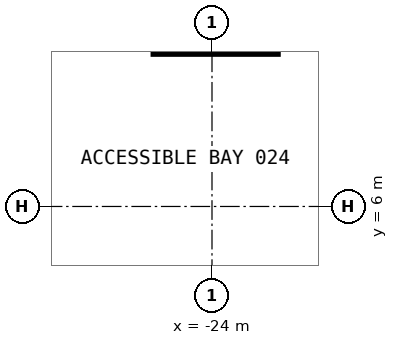
"""IFC4 building model, lengths in metres.
Left out: names, types, materials, properties, quantities, classifications, styles, units other than length and angle.
Written with IfcOpenShell. Run it as: python <this file> out.ifc"""

import sys

from ifc_helpers import new_model, si_unit, direction, frame, origin, place, context, subcontext, project, spatial, polyline, outline, extrude, element, save


model = new_model("IFC4")
c1 = context("Model", 3, precision=1e-05, world=origin(), true_north=direction((0.0, 1.0)))
c2 = subcontext(c1, "Body", "Model", "MODEL_VIEW")
j1 = project(units=[si_unit("LENGTHUNIT", "METRE"), si_unit("PLANEANGLEUNIT", "RADIAN")], contexts=[c1])
p1 = place(None, origin())
s1 = spatial("IfcSite", under=j1, at=p1, CompositionType="ELEMENT")
p2 = place(p1, origin())
s2 = spatial("IfcBuilding", under=s1, at=p2, CompositionType="ELEMENT")
p3 = place(p2, frame((0.0, 0.0, -5.5)))
s3 = spatial("IfcBuildingStorey", under=s2, at=p3, CompositionType="ELEMENT", Elevation=-5.5)
p4 = place(p3, origin())
e1 = element("IfcWall", 1, at=p4, inside=s3, PredefinedType="SHEAR", context=c2, shape_type="SweptSolid", body=[
    extrude(outline(polyline([(-25.553, 14.0), (-25.553, 10.0), (-22.253, 10.0), (-22.253, 14.0), (-25.553, 14.0)])), origin(), (0.0, 0.0, 1.0), 5.5),
])
save(model, sys.argv[1])
